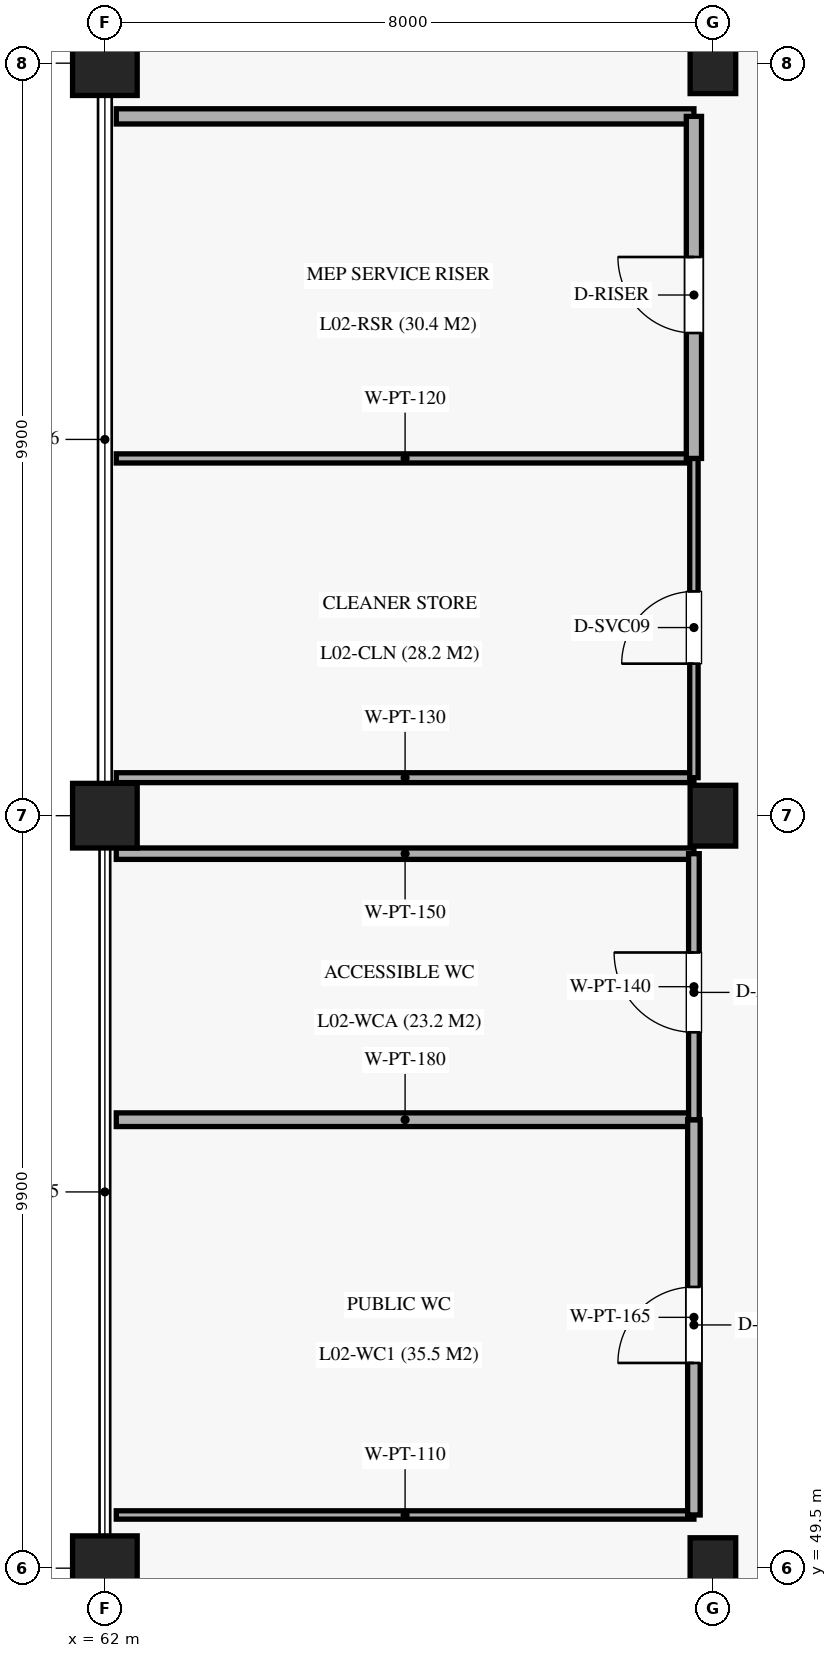
"""IFC4 building model, lengths in metres.
Left out: names, types, materials, properties, quantities, classifications, styles, units other than length and angle.
Written with IfcOpenShell. Run it as: python <this file> out.ifc"""

import sys

from ifc_helpers import new_model, si_unit, direction, frame, frame_2d, origin, origin_2d, place, context, subcontext, project, spatial, rectangle, extrude, element, fill, save


model = new_model("IFC4")
c1 = context("Model", 3, precision=1e-05, world=origin(), true_north=direction((0.0, 1.0)))
c2 = subcontext(c1, "Body", "Model", "MODEL_VIEW")
j1 = project(units=[si_unit("LENGTHUNIT", "METRE"), si_unit("PLANEANGLEUNIT", "RADIAN")], contexts=[c1])
p1 = place(None, origin())
s1 = spatial("IfcSite", under=j1, at=p1, CompositionType="ELEMENT")
p2 = place(p1, origin())
s2 = spatial("IfcBuilding", under=s1, at=p2, CompositionType="ELEMENT")
p3 = place(p2, frame((0.0, 0.0, 10.88)))
s3 = spatial("IfcBuildingStorey", under=s2, at=p3, CompositionType="ELEMENT", Elevation=10.88)
for number, where, z_axis, x_axis in (
    (1, (62.0, 49.5, 0.0), (0.0, 0.0, 1.0), (1.0, 0.0, 0.0)),
    (2, (62.0, 59.4, 0.0), (0.0, 0.0, 1.0), (1.0, 0.0, 0.0)),
    (3, (62.0, 69.3, 0.0), (0.0, 0.0, 1.0), (1.0, 0.0, 0.0)),
):
    element("IfcColumn", number, at=place(p3, frame(where, z_axis=z_axis, x_axis=x_axis)), inside=s3, PredefinedType="COLUMN", context=c2, shape_type="SweptSolid", body=[
        extrude(rectangle(XDim=0.85, YDim=0.85, at=origin_2d()), origin(), (0.0, 0.0, 1.0), 5.44),
    ])
for number, where, z_axis, x_axis in (
    (4, (70.0, 49.5, 0.0), (0.0, 0.0, 1.0), (1.0, 0.0, 0.0)),
    (5, (70.0, 59.4, 0.0), (0.0, 0.0, 1.0), (1.0, 0.0, 0.0)),
    (6, (70.0, 69.3, 0.0), (0.0, 0.0, 1.0), (1.0, 0.0, 0.0)),
):
    element("IfcColumn", number, at=place(p3, frame(where, z_axis=z_axis, x_axis=x_axis)), inside=s3, PredefinedType="COLUMN", context=c2, shape_type="SweptSolid", body=[
        extrude(rectangle(XDim=0.6, YDim=0.8, at=origin_2d()), origin(), (0.0, 0.0, 1.0), 5.44),
    ])
p4 = place(p3, frame((62.15, 50.2, 0.0), z_axis=(0.0, 0.0, 1.0), x_axis=(1.0, 0.0, 0.0)))
e7 = element("IfcWall", 7, at=p4, inside=s3, PredefinedType="PARTITIONING", context=c2, shape_type="SweptSolid", body=[
    extrude(rectangle(XDim=7.6, YDim=0.11, at=frame_2d((3.8, 0.0))), origin(), (0.0, 0.0, 1.0), 4.28),
])
p5 = place(p3, frame((62.15, 55.4, 0.0), z_axis=(0.0, 0.0, 1.0), x_axis=(1.0, 0.0, 0.0)))
e8 = element("IfcWall", 8, at=p5, inside=s3, PredefinedType="PARTITIONING", context=c2, shape_type="SweptSolid", body=[
    extrude(rectangle(XDim=7.6, YDim=0.18, at=frame_2d((3.8, 0.0))), origin(), (0.0, 0.0, 1.0), 4.28),
])
p6 = place(p3, frame((69.75, 50.2, 0.0), z_axis=(0.0, 0.0, 1.0), x_axis=(0.0, 1.0, 0.0)))
e9 = element("IfcWall", 9, at=p6, inside=s3, PredefinedType="PARTITIONING", context=c2, shape_type="SweptSolid", body=[
    extrude(rectangle(XDim=5.2, YDim=0.165, at=frame_2d((2.6, 0.0))), origin(), (0.0, 0.0, 1.0), 4.28),
])
p7 = place(p6, frame((2.0, 0.0, 0.0)))
e10 = element("IfcOpeningElement", 10, at=p7, cuts=e9, PredefinedType="OPENING", context=c2, shape_type="SweptSolid", body=[
    extrude(rectangle(XDim=1.0, YDim=2.1, at=frame_2d((0.5, 1.05))), frame((0.0, 0.093, 0.0), z_axis=(0.0, -1.0, 0.0), x_axis=(1.0, 0.0, 0.0)), (0.0, 0.0, 1.0), 0.185),
])
p8 = place(p3, frame((62.15, 58.9, 0.0), z_axis=(0.0, 0.0, 1.0), x_axis=(1.0, 0.0, 0.0)))
e11 = element("IfcWall", 11, at=p8, inside=s3, PredefinedType="PARTITIONING", context=c2, shape_type="SweptSolid", body=[
    extrude(rectangle(XDim=7.6, YDim=0.15, at=frame_2d((3.8, 0.0))), origin(), (0.0, 0.0, 1.0), 4.28),
])
p9 = place(p3, frame((69.75, 55.4, 0.0), z_axis=(0.0, 0.0, 1.0), x_axis=(0.0, 1.0, 0.0)))
e12 = element("IfcWall", 12, at=p9, inside=s3, PredefinedType="PARTITIONING", context=c2, shape_type="SweptSolid", body=[
    extrude(rectangle(XDim=3.5, YDim=0.14, at=frame_2d((1.75, 0.0))), origin(), (0.0, 0.0, 1.0), 4.28),
])
p10 = place(p9, frame((1.15, 0.0, 0.0)))
e13 = element("IfcOpeningElement", 13, at=p10, cuts=e12, PredefinedType="OPENING", context=c2, shape_type="SweptSolid", body=[
    extrude(rectangle(XDim=1.05, YDim=2.15, at=frame_2d((0.525, 1.075))), frame((0.0, 0.08, 0.0), z_axis=(0.0, -1.0, 0.0), x_axis=(1.0, 0.0, 0.0)), (0.0, 0.0, 1.0), 0.16),
])
p11 = place(p3, frame((62.15, 59.9, 0.0), z_axis=(0.0, 0.0, 1.0), x_axis=(1.0, 0.0, 0.0)))
e14 = element("IfcWall", 14, at=p11, inside=s3, PredefinedType="PARTITIONING", context=c2, shape_type="SweptSolid", body=[
    extrude(rectangle(XDim=7.6, YDim=0.13, at=frame_2d((3.8, 0.0))), origin(), (0.0, 0.0, 1.0), 4.28),
])
p12 = place(p3, frame((62.15, 64.1, 0.0), z_axis=(0.0, 0.0, 1.0), x_axis=(1.0, 0.0, 0.0)))
e15 = element("IfcWall", 15, at=p12, inside=s3, PredefinedType="PARTITIONING", context=c2, shape_type="SweptSolid", body=[
    extrude(rectangle(XDim=7.6, YDim=0.12, at=frame_2d((3.8, 0.0))), origin(), (0.0, 0.0, 1.0), 4.28),
])
p13 = place(p3, frame((69.75, 59.9, 0.0), z_axis=(0.0, 0.0, 1.0), x_axis=(0.0, 1.0, 0.0)))
e16 = element("IfcWall", 16, at=p13, inside=s3, PredefinedType="PARTITIONING", context=c2, shape_type="SweptSolid", body=[
    extrude(rectangle(XDim=4.2, YDim=0.11, at=frame_2d((2.1, 0.0))), origin(), (0.0, 0.0, 1.0), 4.28),
])
p14 = place(p13, frame((1.5, 0.0, 0.0)))
e17 = element("IfcOpeningElement", 17, at=p14, cuts=e16, PredefinedType="OPENING", context=c2, shape_type="SweptSolid", body=[
    extrude(rectangle(XDim=0.95, YDim=2.1, at=frame_2d((0.475, 1.05))), frame((0.0, 0.065, 0.0), z_axis=(0.0, -1.0, 0.0), x_axis=(1.0, 0.0, 0.0)), (0.0, 0.0, 1.0), 0.13),
])
p15 = place(p3, frame((62.15, 68.6, 0.0), z_axis=(0.0, 0.0, 1.0), x_axis=(1.0, 0.0, 0.0)))
e18 = element("IfcWall", 18, at=p15, inside=s3, PredefinedType="SOLIDWALL", context=c2, shape_type="SweptSolid", body=[
    extrude(rectangle(XDim=7.6, YDim=0.2, at=frame_2d((3.8, 0.0))), origin(), (0.0, 0.0, 1.0), 4.28),
])
p16 = place(p3, frame((69.75, 64.1, 0.0), z_axis=(0.0, 0.0, 1.0), x_axis=(0.0, 1.0, 0.0)))
e19 = element("IfcWall", 19, at=p16, inside=s3, PredefinedType="SOLIDWALL", context=c2, shape_type="SweptSolid", body=[
    extrude(rectangle(XDim=4.5, YDim=0.2, at=frame_2d((2.25, 0.0))), origin(), (0.0, 0.0, 1.0), 4.28),
])
p17 = place(p16, frame((1.65, 0.0, 0.0)))
e20 = element("IfcOpeningElement", 20, at=p17, cuts=e19, PredefinedType="OPENING", context=c2, shape_type="SweptSolid", body=[
    extrude(rectangle(XDim=1.0, YDim=2.15, at=frame_2d((0.5, 1.075))), frame((0.0, 0.11, 0.0), z_axis=(0.0, -1.0, 0.0), x_axis=(1.0, 0.0, 0.0)), (0.0, 0.0, 1.0), 0.22),
])
p18 = place(p7, origin())
e21 = element("IfcDoor", 21, at=p18, inside=s3, OperationType="SINGLE_SWING_LEFT", PredefinedType="DOOR", context=c2, shape_type="SweptSolid", body=[
    extrude(rectangle(XDim=1.0, YDim=2.1, at=frame_2d((0.5, 1.05))), frame((0.0, 0.025, 0.0), z_axis=(0.0, -1.0, 0.0), x_axis=(1.0, 0.0, 0.0)), (0.0, 0.0, 1.0), 0.05),
])
fill(e10, e21)
p19 = place(p10, origin())
e22 = element("IfcDoor", 22, at=p19, inside=s3, OperationType="SINGLE_SWING_RIGHT", PredefinedType="DOOR", context=c2, shape_type="SweptSolid", body=[
    extrude(rectangle(XDim=1.05, YDim=2.15, at=frame_2d((0.525, 1.075))), frame((0.0, 0.025, 0.0), z_axis=(0.0, -1.0, 0.0), x_axis=(1.0, 0.0, 0.0)), (0.0, 0.0, 1.0), 0.05),
])
fill(e13, e22)
p20 = place(p14, origin())
e23 = element("IfcDoor", 23, at=p20, inside=s3, OperationType="SINGLE_SWING_LEFT", PredefinedType="DOOR", context=c2, shape_type="SweptSolid", body=[
    extrude(rectangle(XDim=0.95, YDim=2.1, at=frame_2d((0.475, 1.05))), frame((0.0, 0.025, 0.0), z_axis=(0.0, -1.0, 0.0), x_axis=(1.0, 0.0, 0.0)), (0.0, 0.0, 1.0), 0.05),
])
fill(e17, e23)
p21 = place(p17, origin())
e24 = element("IfcDoor", 24, at=p21, inside=s3, OperationType="SINGLE_SWING_RIGHT", PredefinedType="DOOR", context=c2, shape_type="SweptSolid", body=[
    extrude(rectangle(XDim=1.0, YDim=2.15, at=frame_2d((0.5, 1.075))), frame((0.0, 0.025, 0.0), z_axis=(0.0, -1.0, 0.0), x_axis=(1.0, 0.0, 0.0)), (0.0, 0.0, 1.0), 0.05),
])
fill(e20, e24)
save(model, sys.argv[1])
